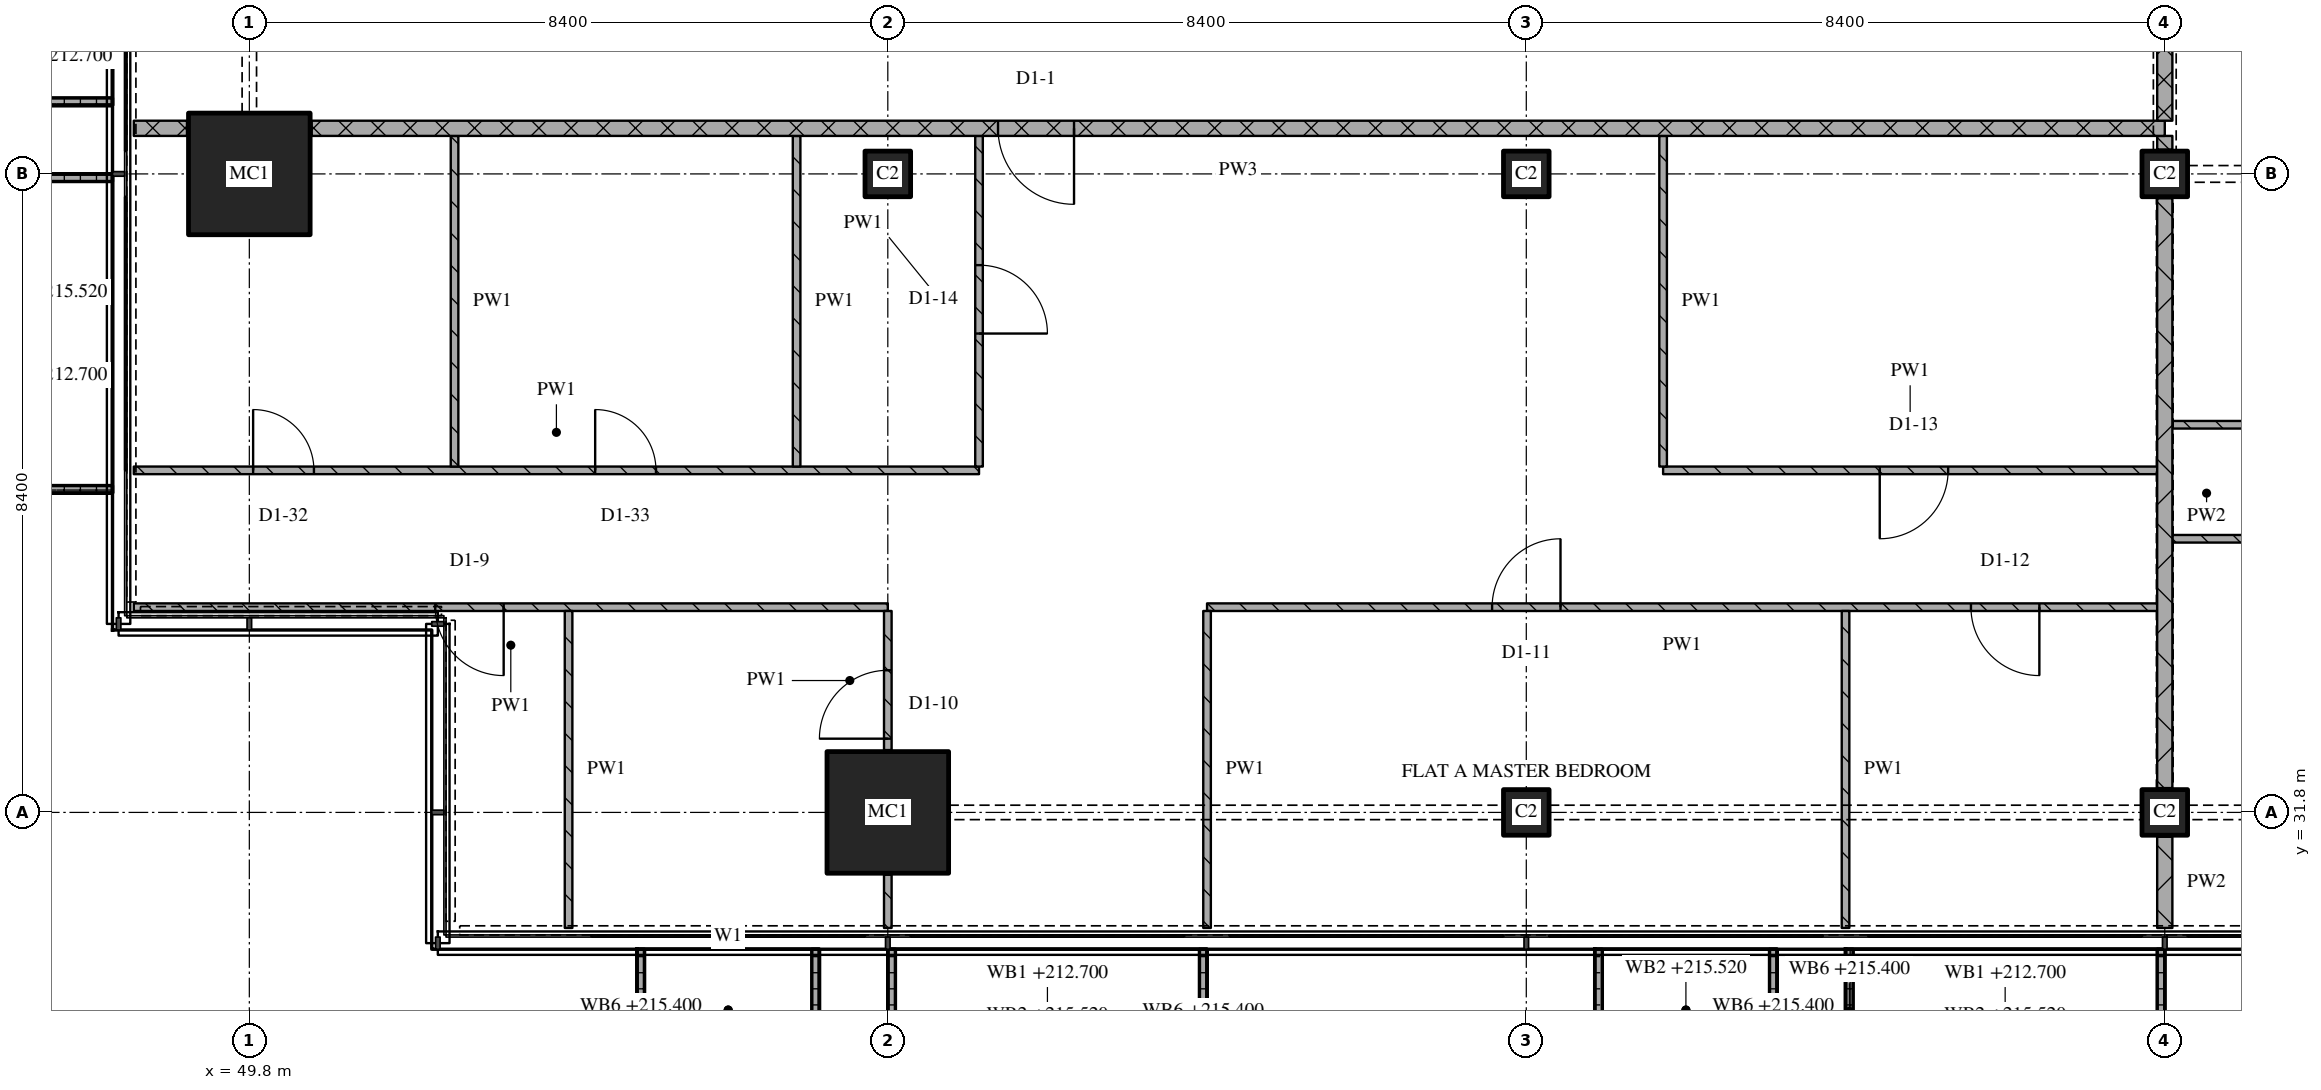
"""IFC4 building model, lengths in metres.
Left out: names, types, materials, properties, quantities, classifications, styles, units other than length and angle.
Written with IfcOpenShell. Run it as: python <this file> out.ifc"""

import sys

from ifc_helpers import new_model, si_unit, direction, frame, frame_2d, origin, origin_2d, place, context, subcontext, project, spatial, polyline, rectangle, outline, extrude, element, fill, save


model = new_model("IFC4")
c1 = context("Model", 3, precision=1e-05, world=origin(), true_north=direction((0.0, 1.0)))
c2 = subcontext(c1, "Body", "Model", "MODEL_VIEW")
j1 = project(units=[si_unit("LENGTHUNIT", "METRE"), si_unit("PLANEANGLEUNIT", "RADIAN")], contexts=[c1])
p1 = place(None, origin())
s1 = spatial("IfcSite", under=j1, at=p1, CompositionType="ELEMENT")
p2 = place(p1, origin())
s2 = spatial("IfcBuilding", under=s1, at=p2, CompositionType="ELEMENT")
p3 = place(p2, frame((0.0, 0.0, 212.7)))
s3 = spatial("IfcBuildingStorey", under=s2, at=p3, CompositionType="ELEMENT", Elevation=212.7)
for number, where, z_axis, x_axis in (
    (1, (49.8, 40.2, 0.0), (0.0, 0.0, 1.0), (1.0, 0.0, 0.0)),
    (2, (58.2, 31.8, 0.0), (0.0, 0.0, 1.0), (1.0, 0.0, 0.0)),
):
    element("IfcColumn", number, at=place(p3, frame(where, z_axis=z_axis, x_axis=x_axis)), inside=s3, PredefinedType="COLUMN", context=c2, shape_type="SweptSolid", body=[
        extrude(rectangle(XDim=1.6, YDim=1.6, at=origin_2d()), origin(), (0.0, 0.0, 1.0), 3.6),
    ])
for number, where, z_axis, x_axis in (
    (3, (58.2, 40.2, 0.0), (0.0, 0.0, 1.0), (1.0, 0.0, 0.0)),
    (4, (66.6, 31.8, 0.0), (0.0, 0.0, 1.0), (1.0, 0.0, 0.0)),
    (5, (66.6, 40.2, 0.0), (0.0, 0.0, 1.0), (1.0, 0.0, 0.0)),
    (6, (75.0, 31.8, 0.0), (0.0, 0.0, 1.0), (1.0, 0.0, 0.0)),
    (7, (75.0, 40.2, 0.0), (0.0, 0.0, 1.0), (1.0, 0.0, 0.0)),
):
    element("IfcColumn", number, at=place(p3, frame(where, z_axis=z_axis, x_axis=x_axis)), inside=s3, PredefinedType="COLUMN", context=c2, shape_type="SweptSolid", body=[
        extrude(rectangle(XDim=0.6, YDim=0.6, at=origin_2d()), origin(), (0.0, 0.0, 1.0), 3.6),
    ])
p4 = place(p3, origin())
e8 = element("IfcWall", 8, at=p4, inside=s3, PredefinedType="SOLIDWALL", context=c2, shape_type="SweptSolid", body=[
    extrude(outline(polyline([(54.9, 30.0), (55.0, 30.0), (55.0, 28.5), (57.2, 28.5), (57.2, 30.0), (57.3, 30.0), (57.3, 28.4), (54.9, 28.4), (54.9, 30.0)])), origin(), (0.0, 0.0, 1.0), 1.0),
])
p5 = place(p3, origin())
e9 = element("IfcWall", 9, at=p5, inside=s3, PredefinedType="SOLIDWALL", context=c2, shape_type="SweptSolid", body=[
    extrude(outline(polyline([(58.2, 30.0), (58.3, 30.0), (58.3, 28.367), (62.3, 28.367), (62.3, 30.0), (62.4, 30.0), (62.4, 28.267), (58.2, 28.267), (58.2, 30.0)])), origin(), (0.0, 0.0, 1.0), 1.0),
])
p6 = place(p3, origin())
e10 = element("IfcWall", 10, at=p6, inside=s3, PredefinedType="SOLIDWALL", context=c2, shape_type="SweptSolid", body=[
    extrude(outline(polyline([(67.5, 30.0), (67.6, 30.0), (67.6, 28.5), (69.8, 28.5), (69.8, 30.0), (69.9, 30.0), (69.9, 28.4), (67.5, 28.4), (67.5, 30.0)])), origin(), (0.0, 0.0, 1.0), 1.0),
])
p7 = place(p3, origin())
e11 = element("IfcWall", 11, at=p7, inside=s3, PredefinedType="SOLIDWALL", context=c2, shape_type="SweptSolid", body=[
    extrude(outline(polyline([(70.8, 30.0), (70.9, 30.0), (70.9, 28.367), (74.9, 28.367), (74.9, 30.0), (75.0, 30.0), (75.0, 28.267), (70.8, 28.267), (70.8, 30.0)])), origin(), (0.0, 0.0, 1.0), 1.0),
])
p8 = place(p3, origin())
e12 = element("IfcWall", 12, at=p8, inside=s3, PredefinedType="SOLIDWALL", context=c2, shape_type="SweptSolid", body=[
    extrude(outline(polyline([(48.0, 43.5), (48.0, 43.4), (46.5, 43.4), (46.5, 41.2), (48.0, 41.2), (48.0, 41.1), (46.4, 41.1), (46.4, 43.5), (48.0, 43.5)])), origin(), (0.0, 0.0, 1.0), 1.0),
])
p9 = place(p3, origin())
e13 = element("IfcWall", 13, at=p9, inside=s3, PredefinedType="SOLIDWALL", context=c2, shape_type="SweptSolid", body=[
    extrude(outline(polyline([(48.0, 40.2), (48.0, 40.1), (46.367, 40.1), (46.367, 36.1), (48.0, 36.1), (48.0, 36.0), (46.267, 36.0), (46.267, 40.2), (48.0, 40.2)])), origin(), (0.0, 0.0, 1.0), 1.0),
])
p10 = place(p3, frame((58.2, 34.5, 0.0), z_axis=(0.0, 0.0, 1.0), x_axis=(-1.0, 0.0, 0.0)))
e14 = element("IfcWall", 14, at=p10, inside=s3, PredefinedType="PARTITIONING", context=c2, shape_type="SweptSolid", body=[
    extrude(rectangle(XDim=9.92, YDim=0.1, at=frame_2d((4.96, 0.0))), origin(), (0.0, 0.0, 1.0), 3.32),
])
p11 = place(p10, frame((5.054, 0.0, 0.0)))
e15 = element("IfcOpeningElement", 15, at=p11, cuts=e14, PredefinedType="OPENING", context=c2, shape_type="SweptSolid", body=[
    extrude(rectangle(XDim=0.9, YDim=2.1, at=frame_2d((0.45, 1.05))), frame((0.0, 0.06, 0.0), z_axis=(0.0, -1.0, 0.0), x_axis=(1.0, 0.0, 0.0)), (0.0, 0.0, 1.0), 0.12),
])
p12 = place(p3, frame((74.9, 34.5, 0.0), z_axis=(0.0, 0.0, 1.0), x_axis=(-1.0, 0.0, 0.0)))
e16 = element("IfcWall", 16, at=p12, inside=s3, PredefinedType="PARTITIONING", context=c2, shape_type="SweptSolid", body=[
    extrude(rectangle(XDim=12.5, YDim=0.1, at=frame_2d((6.25, 0.0))), origin(), (0.0, 0.0, 1.0), 3.32),
])
p13 = place(p12, frame((1.55, 0.0, 0.0)))
e17 = element("IfcOpeningElement", 17, at=p13, cuts=e16, PredefinedType="OPENING", context=c2, shape_type="SweptSolid", body=[
    extrude(rectangle(XDim=0.9, YDim=2.1, at=frame_2d((0.45, 1.05))), frame((0.0, 0.06, 0.0), z_axis=(0.0, -1.0, 0.0), x_axis=(1.0, 0.0, 0.0)), (0.0, 0.0, 1.0), 0.12),
])
p14 = place(p12, frame((7.85, 0.0, 0.0)))
e18 = element("IfcOpeningElement", 18, at=p14, cuts=e16, PredefinedType="OPENING", context=c2, shape_type="SweptSolid", body=[
    extrude(rectangle(XDim=0.9, YDim=2.1, at=frame_2d((0.45, 1.05))), frame((0.0, 0.06, 0.0), z_axis=(0.0, -1.0, 0.0), x_axis=(1.0, 0.0, 0.0)), (0.0, 0.0, 1.0), 0.12),
])
p15 = place(p3, frame((75.1, 35.4, 0.0), z_axis=(0.0, 0.0, 1.0), x_axis=(1.0, 0.0, 0.0)))
e19 = element("IfcWall", 19, at=p15, inside=s3, PredefinedType="PARTITIONING", context=c2, shape_type="SweptSolid", body=[
    extrude(rectangle(XDim=8.3, YDim=0.1, at=frame_2d((4.15, 0.0))), origin(), (0.0, 0.0, 1.0), 3.32),
])
p16 = place(p3, frame((48.28, 36.3, 0.0), z_axis=(0.0, 0.0, 1.0), x_axis=(1.0, 0.0, 0.0)))
e20 = element("IfcWall", 20, at=p16, inside=s3, PredefinedType="PARTITIONING", context=c2, shape_type="SweptSolid", body=[
    extrude(rectangle(XDim=11.12, YDim=0.1, at=frame_2d((5.56, 0.0))), origin(), (0.0, 0.0, 1.0), 3.32),
])
p17 = place(p16, frame((1.57, 0.0, 0.0)))
e21 = element("IfcOpeningElement", 21, at=p17, cuts=e20, PredefinedType="OPENING", context=c2, shape_type="SweptSolid", body=[
    extrude(rectangle(XDim=0.8, YDim=2.1, at=frame_2d((0.4, 1.05))), frame((0.0, 0.06, 0.0), z_axis=(0.0, -1.0, 0.0), x_axis=(1.0, 0.0, 0.0)), (0.0, 0.0, 1.0), 0.12),
])
p18 = place(p16, frame((6.07, 0.0, 0.0)))
e22 = element("IfcOpeningElement", 22, at=p18, cuts=e20, PredefinedType="OPENING", context=c2, shape_type="SweptSolid", body=[
    extrude(rectangle(XDim=0.8, YDim=2.1, at=frame_2d((0.4, 1.05))), frame((0.0, 0.06, 0.0), z_axis=(0.0, -1.0, 0.0), x_axis=(1.0, 0.0, 0.0)), (0.0, 0.0, 1.0), 0.12),
])
p19 = place(p3, frame((68.4, 36.3, 0.0), z_axis=(0.0, 0.0, 1.0), x_axis=(1.0, 0.0, 0.0)))
e23 = element("IfcWall", 23, at=p19, inside=s3, PredefinedType="PARTITIONING", context=c2, shape_type="SweptSolid", body=[
    extrude(rectangle(XDim=6.5, YDim=0.1, at=frame_2d((3.25, 0.0))), origin(), (0.0, 0.0, 1.0), 3.32),
])
p20 = place(p19, frame((2.85, 0.0, 0.0)))
e24 = element("IfcOpeningElement", 24, at=p20, cuts=e23, PredefinedType="OPENING", context=c2, shape_type="SweptSolid", body=[
    extrude(rectangle(XDim=0.9, YDim=2.1, at=frame_2d((0.45, 1.05))), frame((0.0, 0.06, 0.0), z_axis=(0.0, -1.0, 0.0), x_axis=(1.0, 0.0, 0.0)), (0.0, 0.0, 1.0), 0.12),
])
p21 = place(p3, frame((75.1, 36.9, 0.0), z_axis=(0.0, 0.0, 1.0), x_axis=(1.0, 0.0, 0.0)))
e25 = element("IfcWall", 25, at=p21, inside=s3, PredefinedType="PARTITIONING", context=c2, shape_type="SweptSolid", body=[
    extrude(rectangle(XDim=6.5, YDim=0.1, at=frame_2d((3.25, 0.0))), origin(), (0.0, 0.0, 1.0), 3.32),
])
p22 = place(p21, frame((1.603, 0.0, 0.0)))
e26 = element("IfcOpeningElement", 26, at=p22, cuts=e25, PredefinedType="OPENING", context=c2, shape_type="SweptSolid", body=[
    extrude(rectangle(XDim=0.8, YDim=2.1, at=frame_2d((0.4, 1.05))), frame((0.0, 0.06, 0.0), z_axis=(0.0, -1.0, 0.0), x_axis=(1.0, 0.0, 0.0)), (0.0, 0.0, 1.0), 0.12),
])
p23 = place(p3, frame((48.28, 40.8, 0.0), z_axis=(0.0, 0.0, 1.0), x_axis=(1.0, 0.0, 0.0)))
e27 = element("IfcWall", 27, at=p23, inside=s3, PredefinedType="PARTITIONING", context=c2, shape_type="SweptSolid", body=[
    extrude(rectangle(XDim=0.7, YDim=0.2, at=frame_2d((0.35, 0.0))), origin(), (0.0, 0.0, 1.0), 3.32),
])
p24 = place(p3, frame((75.0, 40.8, 0.0), z_axis=(0.0, 0.0, 1.0), x_axis=(-1.0, 0.0, 0.0)))
e28 = element("IfcWall", 28, at=p24, inside=s3, PredefinedType="PARTITIONING", context=c2, shape_type="SweptSolid", body=[
    extrude(rectangle(XDim=24.38, YDim=0.2, at=frame_2d((12.19, 0.0))), origin(), (0.0, 0.0, 1.0), 3.32),
])
p25 = place(p24, frame((14.35, 0.0, 0.0)))
e29 = element("IfcOpeningElement", 29, at=p25, cuts=e28, PredefinedType="OPENING", context=c2, shape_type="SweptSolid", body=[
    extrude(rectangle(XDim=1.0, YDim=2.1, at=frame_2d((0.5, 1.05))), frame((0.0, 0.11, 0.0), z_axis=(0.0, -1.0, 0.0), x_axis=(1.0, 0.0, 0.0)), (0.0, 0.0, 1.0), 0.22),
])
p26 = place(p3, frame((52.5, 40.7, 0.0), z_axis=(0.0, 0.0, 1.0), x_axis=(0.0, -1.0, 0.0)))
e30 = element("IfcWall", 30, at=p26, inside=s3, PredefinedType="PARTITIONING", context=c2, shape_type="SweptSolid", body=[
    extrude(rectangle(XDim=4.35, YDim=0.1, at=frame_2d((2.175, 0.0))), origin(), (0.0, 0.0, 1.0), 3.32),
])
p27 = place(p3, frame((54.0, 34.45, 0.0), z_axis=(0.0, 0.0, 1.0), x_axis=(0.0, -1.0, 0.0)))
e31 = element("IfcWall", 31, at=p27, inside=s3, PredefinedType="PARTITIONING", context=c2, shape_type="SweptSolid", body=[
    extrude(rectangle(XDim=4.17, YDim=0.1, at=frame_2d((2.085, 0.0))), origin(), (0.0, 0.0, 1.0), 3.32),
])
p28 = place(p3, frame((57.0, 40.7, 0.0), z_axis=(0.0, 0.0, 1.0), x_axis=(0.0, -1.0, 0.0)))
e32 = element("IfcWall", 32, at=p28, inside=s3, PredefinedType="PARTITIONING", context=c2, shape_type="SweptSolid", body=[
    extrude(rectangle(XDim=4.35, YDim=0.1, at=frame_2d((2.175, 0.0))), origin(), (0.0, 0.0, 1.0), 3.32),
])
p29 = place(p3, frame((58.2, 30.98, 0.0), z_axis=(0.0, 0.0, 1.0), x_axis=(0.0, -1.0, 0.0)))
e33 = element("IfcWall", 33, at=p29, inside=s3, PredefinedType="PARTITIONING", context=c2, shape_type="SweptSolid", body=[
    extrude(rectangle(XDim=0.7, YDim=0.1, at=frame_2d((0.35, 0.0))), origin(), (0.0, 0.0, 1.0), 3.32),
])
p30 = place(p3, frame((58.2, 32.62, 0.0), z_axis=(0.0, 0.0, 1.0), x_axis=(0.0, 1.0, 0.0)))
e34 = element("IfcWall", 34, at=p30, inside=s3, PredefinedType="PARTITIONING", context=c2, shape_type="SweptSolid", body=[
    extrude(rectangle(XDim=1.83, YDim=0.1, at=frame_2d((0.915, 0.0))), origin(), (0.0, 0.0, 1.0), 3.32),
])
p31 = place(p30, frame((0.15, 0.0, 0.0)))
e35 = element("IfcOpeningElement", 35, at=p31, cuts=e34, PredefinedType="OPENING", context=c2, shape_type="SweptSolid", body=[
    extrude(rectangle(XDim=0.9, YDim=2.1, at=frame_2d((0.45, 1.05))), frame((0.0, 0.06, 0.0), z_axis=(0.0, -1.0, 0.0), x_axis=(1.0, 0.0, 0.0)), (0.0, 0.0, 1.0), 0.12),
])
p32 = place(p3, frame((59.4, 36.35, 0.0), z_axis=(0.0, 0.0, 1.0), x_axis=(0.0, 1.0, 0.0)))
e36 = element("IfcWall", 36, at=p32, inside=s3, PredefinedType="PARTITIONING", context=c2, shape_type="SweptSolid", body=[
    extrude(rectangle(XDim=4.35, YDim=0.1, at=frame_2d((2.175, 0.0))), origin(), (0.0, 0.0, 1.0), 3.32),
])
p33 = place(p32, frame((1.75, 0.0, 0.0)))
e37 = element("IfcOpeningElement", 37, at=p33, cuts=e36, PredefinedType="OPENING", context=c2, shape_type="SweptSolid", body=[
    extrude(rectangle(XDim=0.9, YDim=2.1, at=frame_2d((0.45, 1.05))), frame((0.0, 0.06, 0.0), z_axis=(0.0, -1.0, 0.0), x_axis=(1.0, 0.0, 0.0)), (0.0, 0.0, 1.0), 0.12),
])
p34 = place(p3, frame((62.4, 34.45, 0.0), z_axis=(0.0, 0.0, 1.0), x_axis=(0.0, -1.0, 0.0)))
e38 = element("IfcWall", 38, at=p34, inside=s3, PredefinedType="PARTITIONING", context=c2, shape_type="SweptSolid", body=[
    extrude(rectangle(XDim=4.17, YDim=0.1, at=frame_2d((2.085, 0.0))), origin(), (0.0, 0.0, 1.0), 3.32),
])
p35 = place(p3, frame((68.4, 40.7, 0.0), z_axis=(0.0, 0.0, 1.0), x_axis=(0.0, -1.0, 0.0)))
e39 = element("IfcWall", 39, at=p35, inside=s3, PredefinedType="PARTITIONING", context=c2, shape_type="SweptSolid", body=[
    extrude(rectangle(XDim=4.35, YDim=0.1, at=frame_2d((2.175, 0.0))), origin(), (0.0, 0.0, 1.0), 3.32),
])
p36 = place(p3, frame((70.8, 34.45, 0.0), z_axis=(0.0, 0.0, 1.0), x_axis=(0.0, -1.0, 0.0)))
e40 = element("IfcWall", 40, at=p36, inside=s3, PredefinedType="PARTITIONING", context=c2, shape_type="SweptSolid", body=[
    extrude(rectangle(XDim=4.17, YDim=0.1, at=frame_2d((2.085, 0.0))), origin(), (0.0, 0.0, 1.0), 3.32),
])
p37 = place(p3, frame((75.0, 43.1, 0.0), z_axis=(0.0, 0.0, 1.0), x_axis=(0.0, -1.0, 0.0)))
e41 = element("IfcWall", 41, at=p37, inside=s3, PredefinedType="PARTITIONING", context=c2, shape_type="SweptSolid", body=[
    extrude(rectangle(XDim=2.2, YDim=0.2, at=frame_2d((1.1, 0.0))), origin(), (0.0, 0.0, 1.0), 2.53),
])
p38 = place(p3, frame((75.0, 31.48, 0.0), z_axis=(0.0, 0.0, 1.0), x_axis=(0.0, -1.0, 0.0)))
e42 = element("IfcWall", 42, at=p38, inside=s3, PredefinedType="PARTITIONING", context=c2, shape_type="SweptSolid", body=[
    extrude(rectangle(XDim=1.2, YDim=0.2, at=frame_2d((0.6, 0.0))), origin(), (0.0, 0.0, 1.0), 3.32),
])
p39 = place(p3, frame((75.0, 39.88, 0.0), z_axis=(0.0, 0.0, 1.0), x_axis=(0.0, -1.0, 0.0)))
e43 = element("IfcWall", 43, at=p39, inside=s3, PredefinedType="PARTITIONING", context=c2, shape_type="SweptSolid", body=[
    extrude(rectangle(XDim=7.76, YDim=0.2, at=frame_2d((3.88, 0.0))), origin(), (0.0, 0.0, 1.0), 2.72),
])
p40 = place(p3, frame((75.0, 40.7, 0.0), z_axis=(0.0, 0.0, 1.0), x_axis=(0.0, -1.0, 0.0)))
e44 = element("IfcWall", 44, at=p40, inside=s3, PredefinedType="PARTITIONING", context=c2, shape_type="SweptSolid", body=[
    extrude(rectangle(XDim=0.18, YDim=0.2, at=frame_2d((0.09, 0.0))), origin(), (0.0, 0.0, 1.0), 3.32),
])
p41 = place(p11, origin())
e45 = element("IfcDoor", 45, at=p41, inside=s3, OperationType="SINGLE_SWING_LEFT", PredefinedType="DOOR", context=c2, shape_type="SweptSolid", body=[
    extrude(rectangle(XDim=0.9, YDim=2.1, at=frame_2d((0.45, 1.05))), frame((0.0, 0.025, 0.0), z_axis=(0.0, -1.0, 0.0), x_axis=(1.0, 0.0, 0.0)), (0.0, 0.0, 1.0), 0.05),
])
fill(e15, e45)
p42 = place(p13, origin())
e46 = element("IfcDoor", 46, at=p42, inside=s3, OperationType="SINGLE_SWING_LEFT", PredefinedType="DOOR", context=c2, shape_type="SweptSolid", body=[
    extrude(rectangle(XDim=0.9, YDim=2.1, at=frame_2d((0.45, 1.05))), frame((0.0, 0.025, 0.0), z_axis=(0.0, -1.0, 0.0), x_axis=(1.0, 0.0, 0.0)), (0.0, 0.0, 1.0), 0.05),
])
fill(e17, e46)
p43 = place(p14, origin())
e47 = element("IfcDoor", 47, at=p43, inside=s3, OperationType="SINGLE_SWING_RIGHT", PredefinedType="DOOR", context=c2, shape_type="SweptSolid", body=[
    extrude(rectangle(XDim=0.9, YDim=2.1, at=frame_2d((0.45, 1.05))), frame((0.0, 0.025, 0.0), z_axis=(0.0, -1.0, 0.0), x_axis=(1.0, 0.0, 0.0)), (0.0, 0.0, 1.0), 0.05),
])
fill(e18, e47)
p44 = place(p17, origin())
e48 = element("IfcDoor", 48, at=p44, inside=s3, OperationType="SINGLE_SWING_LEFT", PredefinedType="DOOR", context=c2, shape_type="SweptSolid", body=[
    extrude(rectangle(XDim=0.8, YDim=2.1, at=frame_2d((0.4, 1.05))), frame((0.0, 0.025, 0.0), z_axis=(0.0, -1.0, 0.0), x_axis=(1.0, 0.0, 0.0)), (0.0, 0.0, 1.0), 0.05),
])
fill(e21, e48)
p45 = place(p18, origin())
e49 = element("IfcDoor", 49, at=p45, inside=s3, OperationType="SINGLE_SWING_LEFT", PredefinedType="DOOR", context=c2, shape_type="SweptSolid", body=[
    extrude(rectangle(XDim=0.8, YDim=2.1, at=frame_2d((0.4, 1.05))), frame((0.0, 0.025, 0.0), z_axis=(0.0, -1.0, 0.0), x_axis=(1.0, 0.0, 0.0)), (0.0, 0.0, 1.0), 0.05),
])
fill(e22, e49)
p46 = place(p20, origin())
e50 = element("IfcDoor", 50, at=p46, inside=s3, OperationType="SINGLE_SWING_RIGHT", PredefinedType="DOOR", context=c2, shape_type="SweptSolid", body=[
    extrude(rectangle(XDim=0.9, YDim=2.1, at=frame_2d((0.45, 1.05))), frame((0.0, 0.025, 0.0), z_axis=(0.0, -1.0, 0.0), x_axis=(1.0, 0.0, 0.0)), (0.0, 0.0, 1.0), 0.05),
])
fill(e24, e50)
p47 = place(p25, origin())
e51 = element("IfcDoor", 51, at=p47, inside=s3, OperationType="SINGLE_SWING_LEFT", PredefinedType="DOOR", context=c2, shape_type="SweptSolid", body=[
    extrude(rectangle(XDim=1.0, YDim=2.1, at=frame_2d((0.5, 1.05))), frame((0.0, 0.025, 0.0), z_axis=(0.0, -1.0, 0.0), x_axis=(1.0, 0.0, 0.0)), (0.0, 0.0, 1.0), 0.05),
])
fill(e29, e51)
p48 = place(p31, origin())
e52 = element("IfcDoor", 52, at=p48, inside=s3, OperationType="SINGLE_SWING_LEFT", PredefinedType="DOOR", context=c2, shape_type="SweptSolid", body=[
    extrude(rectangle(XDim=0.9, YDim=2.1, at=frame_2d((0.45, 1.05))), frame((0.0, 0.025, 0.0), z_axis=(0.0, -1.0, 0.0), x_axis=(1.0, 0.0, 0.0)), (0.0, 0.0, 1.0), 0.05),
])
fill(e35, e52)
p49 = place(p33, origin())
e53 = element("IfcDoor", 53, at=p49, inside=s3, OperationType="SINGLE_SWING_RIGHT", PredefinedType="DOOR", context=c2, shape_type="SweptSolid", body=[
    extrude(rectangle(XDim=0.9, YDim=2.1, at=frame_2d((0.45, 1.05))), frame((0.0, 0.025, 0.0), z_axis=(0.0, -1.0, 0.0), x_axis=(1.0, 0.0, 0.0)), (0.0, 0.0, 1.0), 0.05),
])
fill(e37, e53)
save(model, sys.argv[1])
